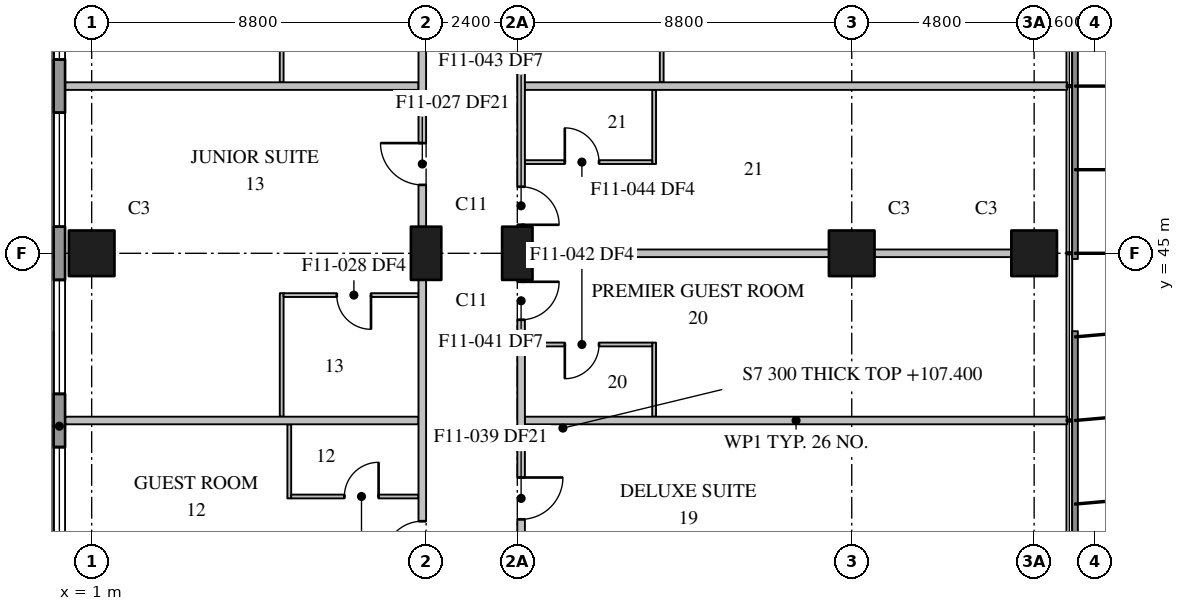
"""IFC4 building model, lengths in metres.
Left out: names, types, materials, properties, quantities, classifications, styles, units other than length and angle.
Written with IfcOpenShell. Run it as: python <this file> out.ifc"""

import sys

from ifc_helpers import new_model, si_unit, direction, frame, frame_2d, origin, origin_2d, place, context, subcontext, project, spatial, rectangle, extrude, element, fill, save


model = new_model("IFC4")
c1 = context("Model", 3, precision=1e-05, world=origin(), true_north=direction((0.0, 1.0)))
c2 = subcontext(c1, "Body", "Model", "MODEL_VIEW")
j1 = project(units=[si_unit("LENGTHUNIT", "METRE"), si_unit("PLANEANGLEUNIT", "RADIAN")], contexts=[c1])
p1 = place(None, origin())
s1 = spatial("IfcSite", under=j1, at=p1, CompositionType="ELEMENT")
p2 = place(p1, origin())
s2 = spatial("IfcBuilding", under=s1, at=p2, CompositionType="ELEMENT")
p3 = place(p2, frame((0.0, 0.0, 107.4)))
s3 = spatial("IfcBuildingStorey", under=s2, at=p3, CompositionType="ELEMENT", Elevation=107.4)
p4 = place(p3, frame((1.0, 45.0, 0.0), z_axis=(0.0, 0.0, 1.0), x_axis=(1.0, 0.0, 0.0)))
e1 = element("IfcColumn", 1, at=p4, inside=s3, PredefinedType="COLUMN", context=c2, shape_type="SweptSolid", body=[
    extrude(rectangle(XDim=1.2, YDim=1.2, at=origin_2d()), origin(), (0.0, 0.0, 1.0), 3.7),
])
for number, where, z_axis, x_axis in (
    (2, (9.8, 45.0, 0.0), (0.0, 0.0, 1.0), (0.0, 1.0, 0.0)),
    (3, (12.2, 45.0, 0.0), (0.0, 0.0, 1.0), (0.0, 1.0, 0.0)),
):
    element("IfcColumn", number, at=place(p3, frame(where, z_axis=z_axis, x_axis=x_axis)), inside=s3, PredefinedType="COLUMN", context=c2, shape_type="SweptSolid", body=[
        extrude(rectangle(XDim=1.4, YDim=0.8, at=origin_2d()), origin(), (0.0, 0.0, 1.0), 3.7),
    ])
for number, where, z_axis, x_axis in (
    (4, (21.0, 45.0, 0.0), (0.0, 0.0, 1.0), (1.0, 0.0, 0.0)),
    (5, (25.8, 45.0, 0.0), (0.0, 0.0, 1.0), (1.0, 0.0, 0.0)),
):
    element("IfcColumn", number, at=place(p3, frame(where, z_axis=z_axis, x_axis=x_axis)), inside=s3, PredefinedType="COLUMN", context=c2, shape_type="SweptSolid", body=[
        extrude(rectangle(XDim=1.2, YDim=1.2, at=origin_2d()), origin(), (0.0, 0.0, 1.0), 3.7),
    ])
p5 = place(p3, frame((0.15, 78.7, 0.0), z_axis=(0.0, 0.0, 1.0), x_axis=(0.0, -1.0, 0.0)))
e6 = element("IfcWall", 6, at=p5, inside=s3, PredefinedType="STANDARD", context=c2, shape_type="SweptSolid", body=[
    extrude(rectangle(XDim=76.5, YDim=0.3, at=frame_2d((38.25, 0.0))), origin(), (0.0, 0.0, 1.0), 3.4),
])
p6 = place(p5, frame((3.6, 0.0, 0.75)))
e7 = element("IfcOpeningElement", 7, at=p6, cuts=e6, PredefinedType="OPENING", context=c2, shape_type="SweptSolid", body=[
    extrude(rectangle(XDim=3.0, YDim=2.3, at=frame_2d((1.5, 1.15))), frame((0.0, 0.16, 0.0), z_axis=(0.0, -1.0, 0.0), x_axis=(1.0, 0.0, 0.0)), (0.0, 0.0, 1.0), 0.32),
])
p7 = place(p5, frame((8.0, 0.0, 0.75)))
e8 = element("IfcOpeningElement", 8, at=p7, cuts=e6, PredefinedType="OPENING", context=c2, shape_type="SweptSolid", body=[
    extrude(rectangle(XDim=3.0, YDim=2.3, at=frame_2d((1.5, 1.15))), frame((0.0, 0.16, 0.0), z_axis=(0.0, -1.0, 0.0), x_axis=(1.0, 0.0, 0.0)), (0.0, 0.0, 1.0), 0.32),
])
p8 = place(p5, frame((12.4, 0.0, 0.75)))
e9 = element("IfcOpeningElement", 9, at=p8, cuts=e6, PredefinedType="OPENING", context=c2, shape_type="SweptSolid", body=[
    extrude(rectangle(XDim=3.0, YDim=2.3, at=frame_2d((1.5, 1.15))), frame((0.0, 0.16, 0.0), z_axis=(0.0, -1.0, 0.0), x_axis=(1.0, 0.0, 0.0)), (0.0, 0.0, 1.0), 0.32),
])
p9 = place(p5, frame((16.8, 0.0, 0.75)))
e10 = element("IfcOpeningElement", 10, at=p9, cuts=e6, PredefinedType="OPENING", context=c2, shape_type="SweptSolid", body=[
    extrude(rectangle(XDim=3.0, YDim=2.3, at=frame_2d((1.5, 1.15))), frame((0.0, 0.16, 0.0), z_axis=(0.0, -1.0, 0.0), x_axis=(1.0, 0.0, 0.0)), (0.0, 0.0, 1.0), 0.32),
])
p10 = place(p5, frame((21.2, 0.0, 0.75)))
e11 = element("IfcOpeningElement", 11, at=p10, cuts=e6, PredefinedType="OPENING", context=c2, shape_type="SweptSolid", body=[
    extrude(rectangle(XDim=3.0, YDim=2.3, at=frame_2d((1.5, 1.15))), frame((0.0, 0.16, 0.0), z_axis=(0.0, -1.0, 0.0), x_axis=(1.0, 0.0, 0.0)), (0.0, 0.0, 1.0), 0.32),
])
p11 = place(p5, frame((25.6, 0.0, 0.75)))
e12 = element("IfcOpeningElement", 12, at=p11, cuts=e6, PredefinedType="OPENING", context=c2, shape_type="SweptSolid", body=[
    extrude(rectangle(XDim=3.0, YDim=2.3, at=frame_2d((1.5, 1.15))), frame((0.0, 0.16, 0.0), z_axis=(0.0, -1.0, 0.0), x_axis=(1.0, 0.0, 0.0)), (0.0, 0.0, 1.0), 0.32),
])
p12 = place(p5, frame((30.0, 0.0, 0.75)))
e13 = element("IfcOpeningElement", 13, at=p12, cuts=e6, PredefinedType="OPENING", context=c2, shape_type="SweptSolid", body=[
    extrude(rectangle(XDim=3.0, YDim=2.3, at=frame_2d((1.5, 1.15))), frame((0.0, 0.16, 0.0), z_axis=(0.0, -1.0, 0.0), x_axis=(1.0, 0.0, 0.0)), (0.0, 0.0, 1.0), 0.32),
])
p13 = place(p5, frame((34.4, 0.0, 0.75)))
e14 = element("IfcOpeningElement", 14, at=p13, cuts=e6, PredefinedType="OPENING", context=c2, shape_type="SweptSolid", body=[
    extrude(rectangle(XDim=3.0, YDim=2.3, at=frame_2d((1.5, 1.15))), frame((0.0, 0.16, 0.0), z_axis=(0.0, -1.0, 0.0), x_axis=(1.0, 0.0, 0.0)), (0.0, 0.0, 1.0), 0.32),
])
p14 = place(p5, frame((38.8, 0.0, 0.75)))
e15 = element("IfcOpeningElement", 15, at=p14, cuts=e6, PredefinedType="OPENING", context=c2, shape_type="SweptSolid", body=[
    extrude(rectangle(XDim=3.0, YDim=2.3, at=frame_2d((1.5, 1.15))), frame((0.0, 0.16, 0.0), z_axis=(0.0, -1.0, 0.0), x_axis=(1.0, 0.0, 0.0)), (0.0, 0.0, 1.0), 0.32),
])
p15 = place(p5, frame((43.2, 0.0, 0.75)))
e16 = element("IfcOpeningElement", 16, at=p15, cuts=e6, PredefinedType="OPENING", context=c2, shape_type="SweptSolid", body=[
    extrude(rectangle(XDim=3.0, YDim=2.3, at=frame_2d((1.5, 1.15))), frame((0.0, 0.16, 0.0), z_axis=(0.0, -1.0, 0.0), x_axis=(1.0, 0.0, 0.0)), (0.0, 0.0, 1.0), 0.32),
])
p16 = place(p5, frame((47.6, 0.0, 0.75)))
e17 = element("IfcOpeningElement", 17, at=p16, cuts=e6, PredefinedType="OPENING", context=c2, shape_type="SweptSolid", body=[
    extrude(rectangle(XDim=3.0, YDim=2.3, at=frame_2d((1.5, 1.15))), frame((0.0, 0.16, 0.0), z_axis=(0.0, -1.0, 0.0), x_axis=(1.0, 0.0, 0.0)), (0.0, 0.0, 1.0), 0.32),
])
p17 = place(p5, frame((52.0, 0.0, 0.75)))
e18 = element("IfcOpeningElement", 18, at=p17, cuts=e6, PredefinedType="OPENING", context=c2, shape_type="SweptSolid", body=[
    extrude(rectangle(XDim=3.0, YDim=2.3, at=frame_2d((1.5, 1.15))), frame((0.0, 0.16, 0.0), z_axis=(0.0, -1.0, 0.0), x_axis=(1.0, 0.0, 0.0)), (0.0, 0.0, 1.0), 0.32),
])
p18 = place(p5, frame((56.4, 0.0, 0.75)))
e19 = element("IfcOpeningElement", 19, at=p18, cuts=e6, PredefinedType="OPENING", context=c2, shape_type="SweptSolid", body=[
    extrude(rectangle(XDim=3.0, YDim=2.3, at=frame_2d((1.5, 1.15))), frame((0.0, 0.16, 0.0), z_axis=(0.0, -1.0, 0.0), x_axis=(1.0, 0.0, 0.0)), (0.0, 0.0, 1.0), 0.32),
])
p19 = place(p5, frame((60.8, 0.0, 0.75)))
e20 = element("IfcOpeningElement", 20, at=p19, cuts=e6, PredefinedType="OPENING", context=c2, shape_type="SweptSolid", body=[
    extrude(rectangle(XDim=3.0, YDim=2.3, at=frame_2d((1.5, 1.15))), frame((0.0, 0.16, 0.0), z_axis=(0.0, -1.0, 0.0), x_axis=(1.0, 0.0, 0.0)), (0.0, 0.0, 1.0), 0.32),
])
p20 = place(p5, frame((65.2, 0.0, 0.75)))
e21 = element("IfcOpeningElement", 21, at=p20, cuts=e6, PredefinedType="OPENING", context=c2, shape_type="SweptSolid", body=[
    extrude(rectangle(XDim=3.0, YDim=2.3, at=frame_2d((1.5, 1.15))), frame((0.0, 0.16, 0.0), z_axis=(0.0, -1.0, 0.0), x_axis=(1.0, 0.0, 0.0)), (0.0, 0.0, 1.0), 0.32),
])
p21 = place(p5, frame((69.6, 0.0, 0.75)))
e22 = element("IfcOpeningElement", 22, at=p21, cuts=e6, PredefinedType="OPENING", context=c2, shape_type="SweptSolid", body=[
    extrude(rectangle(XDim=3.0, YDim=2.3, at=frame_2d((1.5, 1.15))), frame((0.0, 0.16, 0.0), z_axis=(0.0, -1.0, 0.0), x_axis=(1.0, 0.0, 0.0)), (0.0, 0.0, 1.0), 0.32),
])
p22 = place(p3, frame((9.7, 36.9, 0.0), z_axis=(0.0, 0.0, 1.0), x_axis=(0.0, 1.0, 0.0)))
e23 = element("IfcWall", 23, at=p22, inside=s3, PredefinedType="PARTITIONING", context=c2, shape_type="SweptSolid", body=[
    extrude(rectangle(XDim=7.4, YDim=0.2, at=frame_2d((3.7, 0.0))), origin(), (0.0, 0.0, 1.0), 3.4),
])
p23 = place(p22, frame((0.05, 0.0, 0.0)))
e24 = element("IfcOpeningElement", 24, at=p23, cuts=e23, PredefinedType="OPENING", context=c2, shape_type="SweptSolid", body=[
    extrude(rectangle(XDim=1.0, YDim=2.1, at=frame_2d((0.5, 1.05))), frame((0.0, 0.11, 0.0), z_axis=(0.0, -1.0, 0.0), x_axis=(1.0, 0.0, 0.0)), (0.0, 0.0, 1.0), 0.22),
])
p24 = place(p3, frame((9.7, 45.7, 0.0), z_axis=(0.0, 0.0, 1.0), x_axis=(0.0, 1.0, 0.0)))
e25 = element("IfcWall", 25, at=p24, inside=s3, PredefinedType="PARTITIONING", context=c2, shape_type="SweptSolid", body=[
    extrude(rectangle(XDim=7.4, YDim=0.2, at=frame_2d((3.7, 0.0))), origin(), (0.0, 0.0, 1.0), 3.4),
])
p25 = place(p24, frame((1.1, 0.0, 0.0)))
e26 = element("IfcOpeningElement", 26, at=p25, cuts=e25, PredefinedType="OPENING", context=c2, shape_type="SweptSolid", body=[
    extrude(rectangle(XDim=1.1, YDim=2.1, at=frame_2d((0.55, 1.05))), frame((0.0, 0.11, 0.0), z_axis=(0.0, -1.0, 0.0), x_axis=(1.0, 0.0, 0.0)), (0.0, 0.0, 1.0), 0.22),
])
p26 = place(p3, frame((0.31, 40.6, 0.0), z_axis=(0.0, 0.0, 1.0), x_axis=(1.0, 0.0, 0.0)))
e27 = element("IfcWall", 27, at=p26, inside=s3, PredefinedType="PARTITIONING", context=c2, shape_type="SweptSolid", body=[
    extrude(rectangle(XDim=9.29, YDim=0.2, at=frame_2d((4.645, 0.0))), origin(), (0.0, 0.0, 1.0), 3.4),
])
p27 = place(p3, frame((12.4, 40.6, 0.0), z_axis=(0.0, 0.0, 1.0), x_axis=(1.0, 0.0, 0.0)))
e28 = element("IfcWall", 28, at=p27, inside=s3, PredefinedType="PARTITIONING", context=c2, shape_type="SweptSolid", body=[
    extrude(rectangle(XDim=14.27, YDim=0.2, at=frame_2d((7.135, 0.0))), origin(), (0.0, 0.0, 1.0), 3.4),
])
p28 = place(p3, frame((0.31, 49.4, 0.0), z_axis=(0.0, 0.0, 1.0), x_axis=(1.0, 0.0, 0.0)))
e29 = element("IfcWall", 29, at=p28, inside=s3, PredefinedType="PARTITIONING", context=c2, shape_type="SweptSolid", body=[
    extrude(rectangle(XDim=9.29, YDim=0.2, at=frame_2d((4.645, 0.0))), origin(), (0.0, 0.0, 1.0), 3.4),
])
p29 = place(p3, frame((12.4, 49.4, 0.0), z_axis=(0.0, 0.0, 1.0), x_axis=(1.0, 0.0, 0.0)))
e30 = element("IfcWall", 30, at=p29, inside=s3, PredefinedType="PARTITIONING", context=c2, shape_type="SweptSolid", body=[
    extrude(rectangle(XDim=14.27, YDim=0.2, at=frame_2d((7.135, 0.0))), origin(), (0.0, 0.0, 1.0), 3.4),
])
p30 = place(p3, frame((12.3, 44.3, 0.0), z_axis=(0.0, 0.0, 1.0), x_axis=(0.0, -1.0, 0.0)))
e31 = element("IfcWall", 31, at=p30, inside=s3, PredefinedType="PARTITIONING", context=c2, shape_type="SweptSolid", body=[
    extrude(rectangle(XDim=7.4, YDim=0.2, at=frame_2d((3.7, 0.0))), origin(), (0.0, 0.0, 1.0), 3.4),
])
p31 = place(p30, frame((5.2, 0.0, 0.0)))
e32 = element("IfcOpeningElement", 32, at=p31, cuts=e31, PredefinedType="OPENING", context=c2, shape_type="SweptSolid", body=[
    extrude(rectangle(XDim=1.1, YDim=2.1, at=frame_2d((0.55, 1.05))), frame((0.0, 0.11, 0.0), z_axis=(0.0, -1.0, 0.0), x_axis=(1.0, 0.0, 0.0)), (0.0, 0.0, 1.0), 0.22),
])
p32 = place(p30, frame((0.05, 0.0, 0.0)))
e33 = element("IfcOpeningElement", 33, at=p32, cuts=e31, PredefinedType="OPENING", context=c2, shape_type="SweptSolid", body=[
    extrude(rectangle(XDim=1.0, YDim=2.1, at=frame_2d((0.5, 1.05))), frame((0.0, 0.11, 0.0), z_axis=(0.0, -1.0, 0.0), x_axis=(1.0, 0.0, 0.0)), (0.0, 0.0, 1.0), 0.22),
])
p33 = place(p3, frame((12.3, 53.1, 0.0), z_axis=(0.0, 0.0, 1.0), x_axis=(0.0, -1.0, 0.0)))
e34 = element("IfcWall", 34, at=p33, inside=s3, PredefinedType="PARTITIONING", context=c2, shape_type="SweptSolid", body=[
    extrude(rectangle(XDim=7.4, YDim=0.2, at=frame_2d((3.7, 0.0))), origin(), (0.0, 0.0, 1.0), 3.4),
])
p34 = place(p33, frame((6.35, 0.0, 0.0)))
e35 = element("IfcOpeningElement", 35, at=p34, cuts=e34, PredefinedType="OPENING", context=c2, shape_type="SweptSolid", body=[
    extrude(rectangle(XDim=1.0, YDim=2.1, at=frame_2d((0.5, 1.05))), frame((0.0, 0.11, 0.0), z_axis=(0.0, -1.0, 0.0), x_axis=(1.0, 0.0, 0.0)), (0.0, 0.0, 1.0), 0.22),
])
p35 = place(p3, frame((12.6, 45.0, 0.0), z_axis=(0.0, 0.0, 1.0), x_axis=(1.0, 0.0, 0.0)))
e36 = element("IfcWall", 36, at=p35, inside=s3, PredefinedType="PARTITIONING", context=c2, shape_type="SweptSolid", body=[
    extrude(rectangle(XDim=7.8, YDim=0.2, at=frame_2d((3.9, 0.0))), origin(), (0.0, 0.0, 1.0), 3.4),
])
p36 = place(p3, frame((21.6, 45.0, 0.0), z_axis=(0.0, 0.0, 1.0), x_axis=(1.0, 0.0, 0.0)))
e37 = element("IfcWall", 37, at=p36, inside=s3, PredefinedType="PARTITIONING", context=c2, shape_type="SweptSolid", body=[
    extrude(rectangle(XDim=3.6, YDim=0.2, at=frame_2d((1.8, 0.0))), origin(), (0.0, 0.0, 1.0), 3.4),
])
p37 = place(p3, frame((6.2, 38.55, 0.0), z_axis=(0.0, 0.0, 1.0), x_axis=(0.0, 1.0, 0.0)))
e38 = element("IfcWall", 38, at=p37, inside=s3, PredefinedType="PARTITIONING", context=c2, shape_type="SweptSolid", body=[
    extrude(rectangle(XDim=1.95, YDim=0.1, at=frame_2d((0.975, 0.0))), origin(), (0.0, 0.0, 1.0), 3.4),
])
for number, where, z_axis, x_axis in (
    (39, (6.0, 40.7, 0.0), (0.0, 0.0, 1.0), (0.0, 1.0, 0.0)),
    (40, (6.0, 49.5, 0.0), (0.0, 0.0, 1.0), (0.0, 1.0, 0.0)),
):
    element("IfcWall", number, at=place(p3, frame(where, z_axis=z_axis, x_axis=x_axis)), inside=s3, PredefinedType="PARTITIONING", context=c2, shape_type="SweptSolid", body=[
        extrude(rectangle(XDim=3.25, YDim=0.1, at=frame_2d((1.625, 0.0))), origin(), (0.0, 0.0, 1.0), 3.4),
    ])
p38 = place(p3, frame((6.25, 38.6, 0.0), z_axis=(0.0, 0.0, 1.0), x_axis=(1.0, 0.0, 0.0)))
e41 = element("IfcWall", 41, at=p38, inside=s3, PredefinedType="PARTITIONING", context=c2, shape_type="SweptSolid", body=[
    extrude(rectangle(XDim=3.35, YDim=0.1, at=frame_2d((1.675, 0.0))), origin(), (0.0, 0.0, 1.0), 3.4),
])
p39 = place(p38, frame((1.4, 0.0, 0.0)))
e42 = element("IfcOpeningElement", 42, at=p39, cuts=e41, PredefinedType="OPENING", context=c2, shape_type="SweptSolid", body=[
    extrude(rectangle(XDim=0.9, YDim=2.1, at=frame_2d((0.45, 1.05))), frame((0.0, 0.06, 0.0), z_axis=(0.0, -1.0, 0.0), x_axis=(1.0, 0.0, 0.0)), (0.0, 0.0, 1.0), 0.12),
])
p40 = place(p3, frame((9.6, 43.9, 0.0), z_axis=(0.0, 0.0, 1.0), x_axis=(-1.0, 0.0, 0.0)))
e43 = element("IfcWall", 43, at=p40, inside=s3, PredefinedType="PARTITIONING", context=c2, shape_type="SweptSolid", body=[
    extrude(rectangle(XDim=3.55, YDim=0.1, at=frame_2d((1.775, 0.0))), origin(), (0.0, 0.0, 1.0), 3.4),
])
p41 = place(p40, frame((1.25, 0.0, 0.0)))
e44 = element("IfcOpeningElement", 44, at=p41, cuts=e43, PredefinedType="OPENING", context=c2, shape_type="SweptSolid", body=[
    extrude(rectangle(XDim=0.9, YDim=2.1, at=frame_2d((0.45, 1.05))), frame((0.0, 0.06, 0.0), z_axis=(0.0, -1.0, 0.0), x_axis=(1.0, 0.0, 0.0)), (0.0, 0.0, 1.0), 0.12),
])
p42 = place(p3, frame((16.0, 49.5, 0.0), z_axis=(0.0, 0.0, 1.0), x_axis=(0.0, 1.0, 0.0)))
e45 = element("IfcWall", 45, at=p42, inside=s3, PredefinedType="PARTITIONING", context=c2, shape_type="SweptSolid", body=[
    extrude(rectangle(XDim=3.25, YDim=0.1, at=frame_2d((1.625, 0.0))), origin(), (0.0, 0.0, 1.0), 3.4),
])
for number, where, z_axis, x_axis in (
    (46, (15.8, 40.7, 0.0), (0.0, 0.0, 1.0), (0.0, 1.0, 0.0)),
    (47, (15.8, 47.35, 0.0), (0.0, 0.0, 1.0), (0.0, 1.0, 0.0)),
):
    element("IfcWall", number, at=place(p3, frame(where, z_axis=z_axis, x_axis=x_axis)), inside=s3, PredefinedType="PARTITIONING", context=c2, shape_type="SweptSolid", body=[
        extrude(rectangle(XDim=1.95, YDim=0.1, at=frame_2d((0.975, 0.0))), origin(), (0.0, 0.0, 1.0), 3.4),
    ])
p43 = place(p3, frame((15.75, 42.6, 0.0), z_axis=(0.0, 0.0, 1.0), x_axis=(-1.0, 0.0, 0.0)))
e48 = element("IfcWall", 48, at=p43, inside=s3, PredefinedType="PARTITIONING", context=c2, shape_type="SweptSolid", body=[
    extrude(rectangle(XDim=3.35, YDim=0.1, at=frame_2d((1.675, 0.0))), origin(), (0.0, 0.0, 1.0), 3.4),
])
p44 = place(p43, frame((1.4, 0.0, 0.0)))
e49 = element("IfcOpeningElement", 49, at=p44, cuts=e48, PredefinedType="OPENING", context=c2, shape_type="SweptSolid", body=[
    extrude(rectangle(XDim=0.9, YDim=2.1, at=frame_2d((0.45, 1.05))), frame((0.0, 0.06, 0.0), z_axis=(0.0, -1.0, 0.0), x_axis=(1.0, 0.0, 0.0)), (0.0, 0.0, 1.0), 0.12),
])
p45 = place(p3, frame((12.4, 47.4, 0.0), z_axis=(0.0, 0.0, 1.0), x_axis=(1.0, 0.0, 0.0)))
e50 = element("IfcWall", 50, at=p45, inside=s3, PredefinedType="PARTITIONING", context=c2, shape_type="SweptSolid", body=[
    extrude(rectangle(XDim=3.35, YDim=0.1, at=frame_2d((1.675, 0.0))), origin(), (0.0, 0.0, 1.0), 3.4),
])
p46 = place(p45, frame((1.05, 0.0, 0.0)))
e51 = element("IfcOpeningElement", 51, at=p46, cuts=e50, PredefinedType="OPENING", context=c2, shape_type="SweptSolid", body=[
    extrude(rectangle(XDim=0.9, YDim=2.1, at=frame_2d((0.45, 1.05))), frame((0.0, 0.06, 0.0), z_axis=(0.0, -1.0, 0.0), x_axis=(1.0, 0.0, 0.0)), (0.0, 0.0, 1.0), 0.12),
])
p47 = place(p11, origin())
e52 = element("IfcWindow", 52, at=p47, inside=s3, PartitioningType="SINGLE_PANEL", PredefinedType="WINDOW", context=c2, shape_type="SweptSolid", body=[
    extrude(rectangle(XDim=3.0, YDim=2.3, at=frame_2d((1.5, 1.15))), frame((0.0, 0.03, 0.0), z_axis=(0.0, -1.0, 0.0), x_axis=(1.0, 0.0, 0.0)), (0.0, 0.0, 1.0), 0.06),
])
fill(e12, e52)
p48 = place(p12, origin())
e53 = element("IfcWindow", 53, at=p48, inside=s3, PartitioningType="SINGLE_PANEL", PredefinedType="WINDOW", context=c2, shape_type="SweptSolid", body=[
    extrude(rectangle(XDim=3.0, YDim=2.3, at=frame_2d((1.5, 1.15))), frame((0.0, 0.03, 0.0), z_axis=(0.0, -1.0, 0.0), x_axis=(1.0, 0.0, 0.0)), (0.0, 0.0, 1.0), 0.06),
])
fill(e13, e53)
p49 = place(p13, origin())
e54 = element("IfcWindow", 54, at=p49, inside=s3, PartitioningType="SINGLE_PANEL", PredefinedType="WINDOW", context=c2, shape_type="SweptSolid", body=[
    extrude(rectangle(XDim=3.0, YDim=2.3, at=frame_2d((1.5, 1.15))), frame((0.0, 0.03, 0.0), z_axis=(0.0, -1.0, 0.0), x_axis=(1.0, 0.0, 0.0)), (0.0, 0.0, 1.0), 0.06),
])
fill(e14, e54)
p50 = place(p14, origin())
e55 = element("IfcWindow", 55, at=p50, inside=s3, PartitioningType="SINGLE_PANEL", PredefinedType="WINDOW", context=c2, shape_type="SweptSolid", body=[
    extrude(rectangle(XDim=3.0, YDim=2.3, at=frame_2d((1.5, 1.15))), frame((0.0, 0.03, 0.0), z_axis=(0.0, -1.0, 0.0), x_axis=(1.0, 0.0, 0.0)), (0.0, 0.0, 1.0), 0.06),
])
fill(e15, e55)
p51 = place(p23, origin())
e56 = element("IfcDoor", 56, at=p51, inside=s3, OperationType="SINGLE_SWING_LEFT", PredefinedType="DOOR", context=c2, shape_type="SweptSolid", body=[
    extrude(rectangle(XDim=1.0, YDim=2.1, at=frame_2d((0.5, 1.05))), frame((0.0, 0.025, 0.0), z_axis=(0.0, -1.0, 0.0), x_axis=(1.0, 0.0, 0.0)), (0.0, 0.0, 1.0), 0.05),
])
fill(e24, e56)
p52 = place(p39, origin())
e57 = element("IfcDoor", 57, at=p52, inside=s3, OperationType="SINGLE_SWING_RIGHT", PredefinedType="DOOR", context=c2, shape_type="SweptSolid", body=[
    extrude(rectangle(XDim=0.9, YDim=2.1, at=frame_2d((0.45, 1.05))), frame((0.0, 0.025, 0.0), z_axis=(0.0, -1.0, 0.0), x_axis=(1.0, 0.0, 0.0)), (0.0, 0.0, 1.0), 0.05),
])
fill(e42, e57)
p53 = place(p25, origin())
e58 = element("IfcDoor", 58, at=p53, inside=s3, OperationType="SINGLE_SWING_RIGHT", PredefinedType="DOOR", context=c2, shape_type="SweptSolid", body=[
    extrude(rectangle(XDim=1.1, YDim=2.1, at=frame_2d((0.55, 1.05))), frame((0.0, 0.025, 0.0), z_axis=(0.0, -1.0, 0.0), x_axis=(1.0, 0.0, 0.0)), (0.0, 0.0, 1.0), 0.05),
])
fill(e26, e58)
p54 = place(p41, origin())
e59 = element("IfcDoor", 59, at=p54, inside=s3, OperationType="SINGLE_SWING_LEFT", PredefinedType="DOOR", context=c2, shape_type="SweptSolid", body=[
    extrude(rectangle(XDim=0.9, YDim=2.1, at=frame_2d((0.45, 1.05))), frame((0.0, 0.025, 0.0), z_axis=(0.0, -1.0, 0.0), x_axis=(1.0, 0.0, 0.0)), (0.0, 0.0, 1.0), 0.05),
])
fill(e44, e59)
p55 = place(p31, origin())
e60 = element("IfcDoor", 60, at=p55, inside=s3, OperationType="SINGLE_SWING_LEFT", PredefinedType="DOOR", context=c2, shape_type="SweptSolid", body=[
    extrude(rectangle(XDim=1.1, YDim=2.1, at=frame_2d((0.55, 1.05))), frame((0.0, 0.025, 0.0), z_axis=(0.0, -1.0, 0.0), x_axis=(1.0, 0.0, 0.0)), (0.0, 0.0, 1.0), 0.05),
])
fill(e32, e60)
p56 = place(p32, origin())
e61 = element("IfcDoor", 61, at=p56, inside=s3, OperationType="SINGLE_SWING_LEFT", PredefinedType="DOOR", context=c2, shape_type="SweptSolid", body=[
    extrude(rectangle(XDim=1.0, YDim=2.1, at=frame_2d((0.5, 1.05))), frame((0.0, 0.025, 0.0), z_axis=(0.0, -1.0, 0.0), x_axis=(1.0, 0.0, 0.0)), (0.0, 0.0, 1.0), 0.05),
])
fill(e33, e61)
p57 = place(p44, origin())
e62 = element("IfcDoor", 62, at=p57, inside=s3, OperationType="SINGLE_SWING_RIGHT", PredefinedType="DOOR", context=c2, shape_type="SweptSolid", body=[
    extrude(rectangle(XDim=0.9, YDim=2.1, at=frame_2d((0.45, 1.05))), frame((0.0, 0.025, 0.0), z_axis=(0.0, -1.0, 0.0), x_axis=(1.0, 0.0, 0.0)), (0.0, 0.0, 1.0), 0.05),
])
fill(e49, e62)
p58 = place(p34, origin())
e63 = element("IfcDoor", 63, at=p58, inside=s3, OperationType="SINGLE_SWING_RIGHT", PredefinedType="DOOR", context=c2, shape_type="SweptSolid", body=[
    extrude(rectangle(XDim=1.0, YDim=2.1, at=frame_2d((0.5, 1.05))), frame((0.0, 0.025, 0.0), z_axis=(0.0, -1.0, 0.0), x_axis=(1.0, 0.0, 0.0)), (0.0, 0.0, 1.0), 0.05),
])
fill(e35, e63)
p59 = place(p46, origin())
e64 = element("IfcDoor", 64, at=p59, inside=s3, OperationType="SINGLE_SWING_LEFT", PredefinedType="DOOR", context=c2, shape_type="SweptSolid", body=[
    extrude(rectangle(XDim=0.9, YDim=2.1, at=frame_2d((0.45, 1.05))), frame((0.0, 0.025, 0.0), z_axis=(0.0, -1.0, 0.0), x_axis=(1.0, 0.0, 0.0)), (0.0, 0.0, 1.0), 0.05),
])
fill(e51, e64)
save(model, sys.argv[1])
